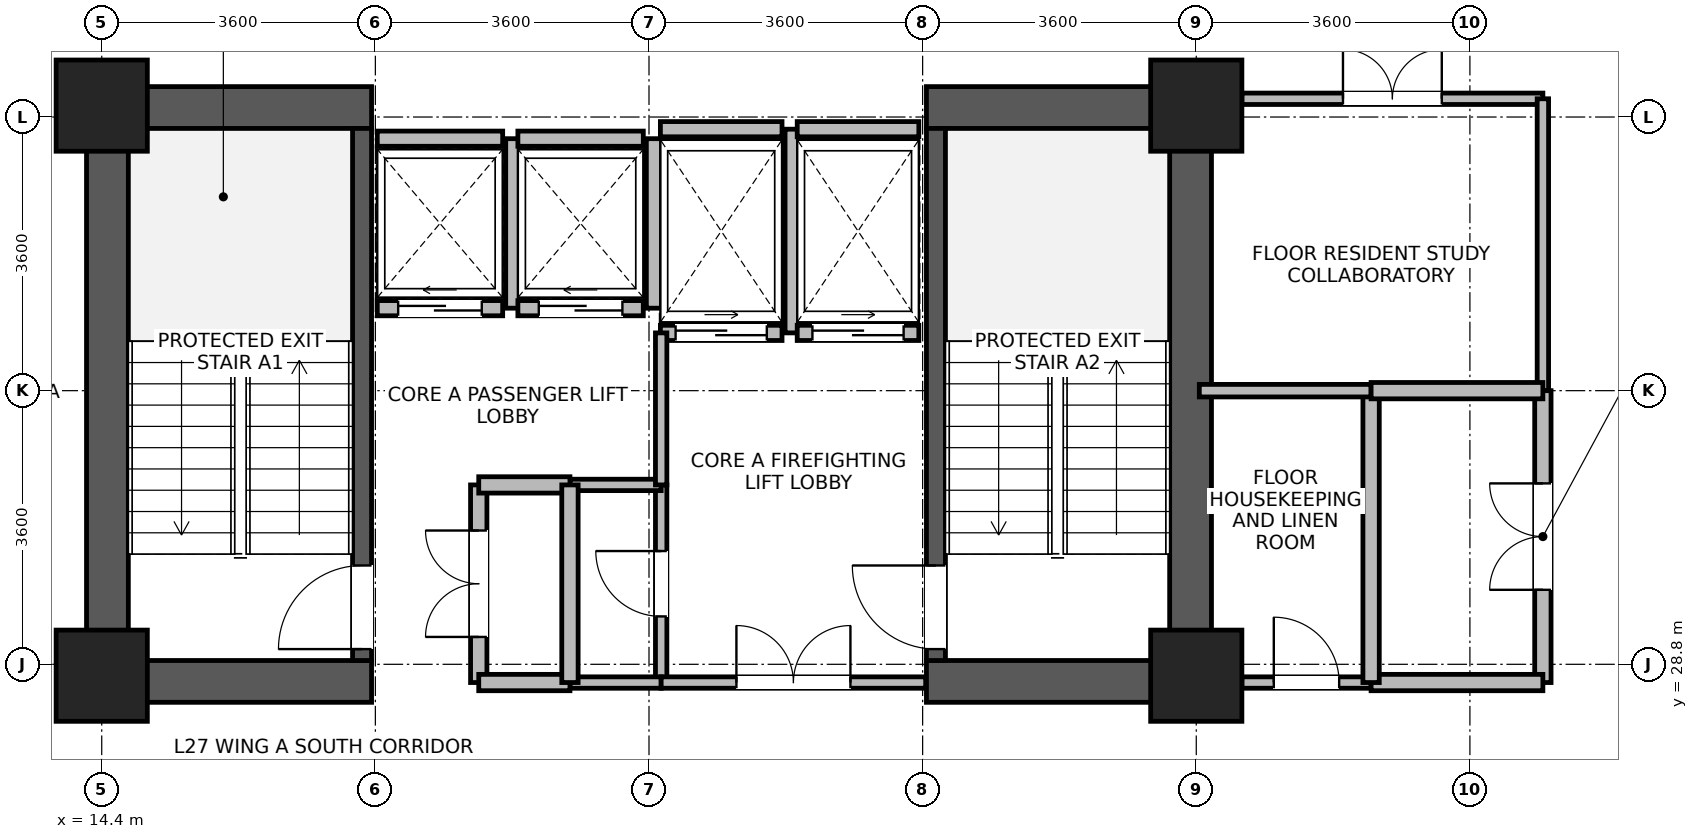
"""IFC4 building model, lengths in metres.
Left out: names, types, materials, properties, quantities, classifications, styles, units other than length and angle.
Written with IfcOpenShell. Run it as: python <this file> out.ifc"""

import sys

from ifc_helpers import new_model, si_unit, direction, frame, frame_2d, origin, origin_2d, place, context, subcontext, project, spatial, rectangle, extrude, source, transform, mapped, element, fill, save


model = new_model("IFC4")
c1 = context("Model", 3, precision=1e-05, world=origin(), true_north=direction((0.0, 1.0)))
c2 = subcontext(c1, "Body", "Model", "MODEL_VIEW")
j1 = project(units=[si_unit("LENGTHUNIT", "METRE"), si_unit("PLANEANGLEUNIT", "RADIAN")], contexts=[c1])
p1 = place(None, origin())
s1 = spatial("IfcSite", under=j1, at=p1, CompositionType="ELEMENT")
p2 = place(p1, origin())
s2 = spatial("IfcBuilding", under=s1, at=p2, CompositionType="ELEMENT")
p3 = place(p2, frame((0.0, 0.0, 108.2)))
s3 = spatial("IfcBuildingStorey", under=s2, at=p3, CompositionType="ELEMENT", Elevation=108.2)
for number, where, z_axis, x_axis in (
    (1, (14.475, 28.3, 0.0), (0.0, 0.0, 1.0), (0.0, 1.0, 0.0)),
    (2, (28.725, 28.3, 0.0), (0.0, 0.0, 1.0), (0.0, 1.0, 0.0)),
):
    element("IfcWall", number, at=place(p3, frame(where, z_axis=z_axis, x_axis=x_axis)), inside=s3, PredefinedType="SHEAR", context=c2, shape_type="SweptSolid", body=[
        extrude(rectangle(XDim=8.1, YDim=0.55, at=frame_2d((4.05, 0.0))), origin(), (0.0, 0.0, 1.0), 3.45),
    ])
for number, where, z_axis, x_axis in (
    (3, (14.75, 28.575, 0.0), (0.0, 0.0, 1.0), (1.0, 0.0, 0.0)),
    (4, (25.25, 28.575, 0.0), (0.0, 0.0, 1.0), (1.0, 0.0, 0.0)),
    (5, (14.75, 36.125, 0.0), (0.0, 0.0, 1.0), (1.0, 0.0, 0.0)),
    (6, (25.25, 36.125, 0.0), (0.0, 0.0, 1.0), (1.0, 0.0, 0.0)),
):
    element("IfcWall", number, at=place(p3, frame(where, z_axis=z_axis, x_axis=x_axis)), inside=s3, PredefinedType="SHEAR", context=c2, shape_type="SweptSolid", body=[
        extrude(rectangle(XDim=3.2, YDim=0.55, at=frame_2d((1.6, 0.0))), origin(), (0.0, 0.0, 1.0), 3.45),
    ])
p4 = place(p3, frame((17.825, 28.85, 0.0), z_axis=(0.0, 0.0, 1.0), x_axis=(0.0, 1.0, 0.0)))
e7 = element("IfcWall", 7, at=p4, inside=s3, PredefinedType="SHEAR", context=c2, shape_type="SweptSolid", body=[
    extrude(rectangle(XDim=7.0, YDim=0.25, at=frame_2d((3.5, 0.0))), origin(), (0.0, 0.0, 1.0), 3.45),
])
p5 = place(p4, frame((0.15, 0.0, 0.0)))
e8 = element("IfcOpeningElement", 8, at=p5, cuts=e7, PredefinedType="OPENING", context=c2, shape_type="SweptSolid", body=[
    extrude(rectangle(XDim=1.1, YDim=2.08, at=frame_2d((0.55, 1.04))), frame((0.0, 0.135, 0.0), z_axis=(0.0, -1.0, 0.0), x_axis=(1.0, 0.0, 0.0)), (0.0, 0.0, 1.0), 0.27),
])
p6 = place(p3, frame((25.375, 28.85, 0.0), z_axis=(0.0, 0.0, 1.0), x_axis=(0.0, 1.0, 0.0)))
e9 = element("IfcWall", 9, at=p6, inside=s3, PredefinedType="SHEAR", context=c2, shape_type="SweptSolid", body=[
    extrude(rectangle(XDim=7.0, YDim=0.25, at=frame_2d((3.5, 0.0))), origin(), (0.0, 0.0, 1.0), 3.45),
])
p7 = place(p6, frame((0.15, 0.0, 0.0)))
e10 = element("IfcOpeningElement", 10, at=p7, cuts=e9, PredefinedType="OPENING", context=c2, shape_type="SweptSolid", body=[
    extrude(rectangle(XDim=1.1, YDim=2.08, at=frame_2d((0.55, 1.04))), frame((0.0, 0.135, 0.0), z_axis=(0.0, -1.0, 0.0), x_axis=(1.0, 0.0, 0.0)), (0.0, 0.0, 1.0), 0.27),
])
m1 = source(origin(), c2, "Body", "SweptSolid", [
    extrude(rectangle(XDim=1.2, YDim=1.2, at=origin_2d()), origin(), (0.0, 0.0, 1.0), 3.7),
])
for number, where, z_axis, x_axis in (
    (11, (14.4, 28.65, 0.0), (0.0, 0.0, 1.0), (1.0, 0.0, 0.0)),
    (12, (14.4, 36.15, 0.0), (0.0, 0.0, 1.0), (1.0, 0.0, 0.0)),
    (13, (28.8, 28.65, 0.0), (0.0, 0.0, 1.0), (1.0, 0.0, 0.0)),
    (14, (28.8, 36.15, 0.0), (0.0, 0.0, 1.0), (1.0, 0.0, 0.0)),
):
    element("IfcColumn", number, at=place(p3, frame(where, z_axis=z_axis, x_axis=x_axis)), inside=s3, PredefinedType="COLUMN", context=c2, shape_type="MappedRepresentation", body=[
        mapped(m1, transform((0.0, 0.0, 0.0), x_axis=(1.0, 0.0, 0.0), y_axis=(0.0, 1.0, 0.0), z_axis=(0.0, 0.0, 1.0), scale=1.0)),
    ])
p8 = place(p3, frame((18.025, 33.485, 0.0), z_axis=(0.0, 0.0, 1.0), x_axis=(1.0, 0.0, 0.0)))
e15 = element("IfcWall", 15, at=p8, inside=s3, PredefinedType="PARTITIONING", context=c2, shape_type="SweptSolid", body=[
    extrude(rectangle(XDim=1.65, YDim=0.2, at=frame_2d((0.825, 0.0))), origin(), (0.0, 0.0, 1.0), 3.43),
])
p9 = place(p8, frame((0.275, 0.0, 0.0)))
e16 = element("IfcOpeningElement", 16, at=p9, cuts=e15, PredefinedType="OPENING", context=c2, shape_type="SweptSolid", body=[
    extrude(rectangle(XDim=1.1, YDim=2.12, at=frame_2d((0.55, 1.06))), frame((0.0, 0.11, 0.0), z_axis=(0.0, -1.0, 0.0), x_axis=(1.0, 0.0, 0.0)), (0.0, 0.0, 1.0), 0.22),
])
p10 = place(p3, frame((18.025, 35.715, 0.0), z_axis=(0.0, 0.0, 1.0), x_axis=(1.0, 0.0, 0.0)))
e17 = element("IfcWall", 17, at=p10, inside=s3, PredefinedType="PARTITIONING", context=c2, shape_type="SweptSolid", body=[
    extrude(rectangle(XDim=1.65, YDim=0.2, at=frame_2d((0.825, 0.0))), origin(), (0.0, 0.0, 1.0), 3.43),
])
p11 = place(p3, frame((19.815, 33.485, 0.0), z_axis=(0.0, 0.0, 1.0), x_axis=(0.0, 1.0, 0.0)))
e18 = element("IfcWall", 18, at=p11, inside=s3, PredefinedType="PARTITIONING", context=c2, shape_type="SweptSolid", body=[
    extrude(rectangle(XDim=2.23, YDim=0.2, at=frame_2d((1.115, 0.0))), origin(), (0.0, 0.0, 1.0), 3.43),
])
p12 = place(p3, frame((19.875, 33.485, 0.0), z_axis=(0.0, 0.0, 1.0), x_axis=(1.0, 0.0, 0.0)))
e19 = element("IfcWall", 19, at=p12, inside=s3, PredefinedType="PARTITIONING", context=c2, shape_type="SweptSolid", body=[
    extrude(rectangle(XDim=1.65, YDim=0.2, at=frame_2d((0.825, 0.0))), origin(), (0.0, 0.0, 1.0), 3.43),
])
p13 = place(p12, frame((0.275, 0.0, 0.0)))
e20 = element("IfcOpeningElement", 20, at=p13, cuts=e19, PredefinedType="OPENING", context=c2, shape_type="SweptSolid", body=[
    extrude(rectangle(XDim=1.1, YDim=2.12, at=frame_2d((0.55, 1.06))), frame((0.0, 0.11, 0.0), z_axis=(0.0, -1.0, 0.0), x_axis=(1.0, 0.0, 0.0)), (0.0, 0.0, 1.0), 0.22),
])
p14 = place(p3, frame((19.875, 35.715, 0.0), z_axis=(0.0, 0.0, 1.0), x_axis=(1.0, 0.0, 0.0)))
e21 = element("IfcWall", 21, at=p14, inside=s3, PredefinedType="PARTITIONING", context=c2, shape_type="SweptSolid", body=[
    extrude(rectangle(XDim=1.65, YDim=0.2, at=frame_2d((0.825, 0.0))), origin(), (0.0, 0.0, 1.0), 3.43),
])
p15 = place(p3, frame((21.665, 33.485, 0.0), z_axis=(0.0, 0.0, 1.0), x_axis=(0.0, 1.0, 0.0)))
e22 = element("IfcWall", 22, at=p15, inside=s3, PredefinedType="PARTITIONING", context=c2, shape_type="SweptSolid", body=[
    extrude(rectangle(XDim=2.23, YDim=0.2, at=frame_2d((1.115, 0.0))), origin(), (0.0, 0.0, 1.0), 3.43),
])
p16 = place(p3, frame((21.75, 33.16, 0.0), z_axis=(0.0, 0.0, 1.0), x_axis=(1.0, 0.0, 0.0)))
e23 = element("IfcWall", 23, at=p16, inside=s3, PredefinedType="PARTITIONING", context=c2, shape_type="SweptSolid", body=[
    extrude(rectangle(XDim=1.6, YDim=0.2, at=frame_2d((0.8, 0.0))), origin(), (0.0, 0.0, 1.0), 3.43),
])
p17 = place(p16, frame((0.2, 0.0, 0.0)))
e24 = element("IfcOpeningElement", 24, at=p17, cuts=e23, PredefinedType="OPENING", context=c2, shape_type="SweptSolid", body=[
    extrude(rectangle(XDim=1.2, YDim=2.12, at=frame_2d((0.6, 1.06))), frame((0.0, 0.11, 0.0), z_axis=(0.0, -1.0, 0.0), x_axis=(1.0, 0.0, 0.0)), (0.0, 0.0, 1.0), 0.22),
])
p18 = place(p3, frame((21.75, 35.84, 0.0), z_axis=(0.0, 0.0, 1.0), x_axis=(1.0, 0.0, 0.0)))
e25 = element("IfcWall", 25, at=p18, inside=s3, PredefinedType="PARTITIONING", context=c2, shape_type="SweptSolid", body=[
    extrude(rectangle(XDim=1.6, YDim=0.2, at=frame_2d((0.8, 0.0))), origin(), (0.0, 0.0, 1.0), 2.43),
])
p19 = place(p3, frame((23.49, 33.16, 0.0), z_axis=(0.0, 0.0, 1.0), x_axis=(0.0, 1.0, 0.0)))
e26 = element("IfcWall", 26, at=p19, inside=s3, PredefinedType="PARTITIONING", context=c2, shape_type="SweptSolid", body=[
    extrude(rectangle(XDim=2.68, YDim=0.2, at=frame_2d((1.34, 0.0))), origin(), (0.0, 0.0, 1.0), 3.43),
])
p20 = place(p3, frame((23.55, 33.16, 0.0), z_axis=(0.0, 0.0, 1.0), x_axis=(1.0, 0.0, 0.0)))
e27 = element("IfcWall", 27, at=p20, inside=s3, PredefinedType="PARTITIONING", context=c2, shape_type="SweptSolid", body=[
    extrude(rectangle(XDim=1.6, YDim=0.2, at=frame_2d((0.8, 0.0))), origin(), (0.0, 0.0, 1.0), 3.43),
])
p21 = place(p20, frame((0.2, 0.0, 0.0)))
e28 = element("IfcOpeningElement", 28, at=p21, cuts=e27, PredefinedType="OPENING", context=c2, shape_type="SweptSolid", body=[
    extrude(rectangle(XDim=1.2, YDim=2.12, at=frame_2d((0.6, 1.06))), frame((0.0, 0.11, 0.0), z_axis=(0.0, -1.0, 0.0), x_axis=(1.0, 0.0, 0.0)), (0.0, 0.0, 1.0), 0.22),
])
p22 = place(p3, frame((23.55, 35.84, 0.0), z_axis=(0.0, 0.0, 1.0), x_axis=(1.0, 0.0, 0.0)))
e29 = element("IfcWall", 29, at=p22, inside=s3, PredefinedType="PARTITIONING", context=c2, shape_type="SweptSolid", body=[
    extrude(rectangle(XDim=1.6, YDim=0.2, at=frame_2d((0.8, 0.0))), origin(), (0.0, 0.0, 1.0), 2.43),
])
p23 = place(p3, frame((29.4, 36.24, 0.0), z_axis=(0.0, 0.0, 1.0), x_axis=(1.0, 0.0, 0.0)))
e30 = element("IfcWall", 30, at=p23, inside=s3, PredefinedType="PARTITIONING", context=c2, shape_type="SweptSolid", body=[
    extrude(rectangle(XDim=3.96, YDim=0.15, at=frame_2d((1.98, 0.0))), origin(), (0.0, 0.0, 1.0), 2.78),
])
p24 = place(p23, frame((1.33, 0.0, 0.0)))
e31 = element("IfcOpeningElement", 31, at=p24, cuts=e30, PredefinedType="OPENING", context=c2, shape_type="SweptSolid", body=[
    extrude(rectangle(XDim=1.3, YDim=2.12, at=frame_2d((0.65, 1.06))), frame((0.0, 0.085, 0.0), z_axis=(0.0, -1.0, 0.0), x_axis=(1.0, 0.0, 0.0)), (0.0, 0.0, 1.0), 0.17),
])
p25 = place(p3, frame((33.36, 32.4, 0.0), z_axis=(0.0, 0.0, 1.0), x_axis=(0.0, 1.0, 0.0)))
e32 = element("IfcWall", 32, at=p25, inside=s3, PredefinedType="PARTITIONING", context=c2, shape_type="SweptSolid", body=[
    extrude(rectangle(XDim=3.84, YDim=0.15, at=frame_2d((1.92, 0.0))), origin(), (0.0, 0.0, 1.0), 3.43),
])
p26 = place(p3, frame((33.36, 28.56, 0.0), z_axis=(0.0, 0.0, 1.0), x_axis=(0.0, 1.0, 0.0)))
e33 = element("IfcWall", 33, at=p26, inside=s3, PredefinedType="PARTITIONING", context=c2, shape_type="SweptSolid", body=[
    extrude(rectangle(XDim=3.84, YDim=0.215, at=frame_2d((1.92, 0.0))), origin(), (0.0, 0.0, 1.0), 3.43),
])
p27 = place(p26, frame((1.22, 0.0, 0.0)))
e34 = element("IfcOpeningElement", 34, at=p27, cuts=e33, PredefinedType="OPENING", context=c2, shape_type="SweptSolid", body=[
    extrude(rectangle(XDim=1.4, YDim=2.15, at=frame_2d((0.7, 1.075))), frame((0.0, 0.118, 0.0), z_axis=(0.0, -1.0, 0.0), x_axis=(1.0, 0.0, 0.0)), (0.0, 0.0, 1.0), 0.235),
])
p28 = place(p3, frame((19.36, 28.56, 0.0), z_axis=(0.0, 0.0, 1.0), x_axis=(0.0, 1.0, 0.0)))
e35 = element("IfcWall", 35, at=p28, inside=s3, PredefinedType="PARTITIONING", context=c2, shape_type="SweptSolid", body=[
    extrude(rectangle(XDim=2.6, YDim=0.215, at=frame_2d((1.3, 0.0))), origin(), (0.0, 0.0, 1.0), 3.43),
])
p29 = place(p28, frame((0.6, 0.0, 0.0)))
e36 = element("IfcOpeningElement", 36, at=p29, cuts=e35, PredefinedType="OPENING", context=c2, shape_type="SweptSolid", body=[
    extrude(rectangle(XDim=1.4, YDim=2.15, at=frame_2d((0.7, 1.075))), frame((0.0, 0.118, 0.0), z_axis=(0.0, -1.0, 0.0), x_axis=(1.0, 0.0, 0.0)), (0.0, 0.0, 1.0), 0.235),
])
p30 = place(p3, frame((21.76, 28.56, 0.0), z_axis=(0.0, 0.0, 1.0), x_axis=(0.0, 1.0, 0.0)))
e37 = element("IfcWall", 37, at=p30, inside=s3, PredefinedType="PARTITIONING", context=c2, shape_type="SweptSolid", body=[
    extrude(rectangle(XDim=2.6, YDim=0.15, at=frame_2d((1.3, 0.0))), origin(), (0.0, 0.0, 1.0), 3.43),
])
p31 = place(p30, frame((0.87, 0.0, 0.0)))
e38 = element("IfcOpeningElement", 38, at=p31, cuts=e37, PredefinedType="OPENING", context=c2, shape_type="SweptSolid", body=[
    extrude(rectangle(XDim=0.86, YDim=2.02, at=frame_2d((0.43, 1.01))), frame((0.0, 0.085, 0.0), z_axis=(0.0, -1.0, 0.0), x_axis=(1.0, 0.0, 0.0)), (0.0, 0.0, 1.0), 0.17),
])
p32 = place(p3, frame((29.4, 28.56, 0.0), z_axis=(0.0, 0.0, 1.0), x_axis=(1.0, 0.0, 0.0)))
e39 = element("IfcWall", 39, at=p32, inside=s3, PredefinedType="PARTITIONING", context=c2, shape_type="SweptSolid", body=[
    extrude(rectangle(XDim=1.7, YDim=0.15, at=frame_2d((0.85, 0.0))), origin(), (0.0, 0.0, 1.0), 2.78),
])
p33 = place(p32, frame((0.42, 0.0, 0.0)))
e40 = element("IfcOpeningElement", 40, at=p33, cuts=e39, PredefinedType="OPENING", context=c2, shape_type="SweptSolid", body=[
    extrude(rectangle(XDim=0.86, YDim=2.02, at=frame_2d((0.43, 1.01))), frame((0.0, 0.085, 0.0), z_axis=(0.0, -1.0, 0.0), x_axis=(1.0, 0.0, 0.0)), (0.0, 0.0, 1.0), 0.17),
])
p34 = place(p3, frame((31.1, 28.56, 0.0), z_axis=(0.0, 0.0, 1.0), x_axis=(1.0, 0.0, 0.0)))
e41 = element("IfcWall", 41, at=p34, inside=s3, PredefinedType="PARTITIONING", context=c2, shape_type="SweptSolid", body=[
    extrude(rectangle(XDim=2.26, YDim=0.215, at=frame_2d((1.13, 0.0))), origin(), (0.0, 0.0, 1.0), 2.78),
])
p35 = place(p3, frame((20.56, 28.56, 0.0), z_axis=(0.0, 0.0, 1.0), x_axis=(1.0, 0.0, 0.0)))
e42 = element("IfcWall", 42, at=p35, inside=s3, PredefinedType="PARTITIONING", context=c2, shape_type="SweptSolid", body=[
    extrude(rectangle(XDim=1.2, YDim=0.15, at=frame_2d((0.6, 0.0))), origin(), (0.0, 0.0, 1.0), 2.43),
])
p36 = place(p3, frame((20.56, 31.16, 0.0), z_axis=(0.0, 0.0, 1.0), x_axis=(1.0, 0.0, 0.0)))
e43 = element("IfcWall", 43, at=p36, inside=s3, PredefinedType="PARTITIONING", context=c2, shape_type="SweptSolid", body=[
    extrude(rectangle(XDim=1.2, YDim=0.15, at=frame_2d((0.6, 0.0))), origin(), (0.0, 0.0, 1.0), 3.43),
])
p37 = place(p3, frame((19.36, 28.56, 0.0), z_axis=(0.0, 0.0, 1.0), x_axis=(1.0, 0.0, 0.0)))
e44 = element("IfcWall", 44, at=p37, inside=s3, PredefinedType="PARTITIONING", context=c2, shape_type="SweptSolid", body=[
    extrude(rectangle(XDim=1.2, YDim=0.215, at=frame_2d((0.6, 0.0))), origin(), (0.0, 0.0, 1.0), 2.43),
])
p38 = place(p3, frame((19.36, 31.16, 0.0), z_axis=(0.0, 0.0, 1.0), x_axis=(1.0, 0.0, 0.0)))
e45 = element("IfcWall", 45, at=p38, inside=s3, PredefinedType="PARTITIONING", context=c2, shape_type="SweptSolid", body=[
    extrude(rectangle(XDim=1.2, YDim=0.215, at=frame_2d((0.6, 0.0))), origin(), (0.0, 0.0, 1.0), 3.43),
])
p39 = place(p3, frame((31.1, 28.56, 0.0), z_axis=(0.0, 0.0, 1.0), x_axis=(0.0, 1.0, 0.0)))
e46 = element("IfcWall", 46, at=p39, inside=s3, PredefinedType="PARTITIONING", context=c2, shape_type="SweptSolid", body=[
    extrude(rectangle(XDim=3.84, YDim=0.215, at=frame_2d((1.92, 0.0))), origin(), (0.0, 0.0, 1.0), 3.43),
])
p40 = place(p3, frame((21.76, 28.56, 0.0), z_axis=(0.0, 0.0, 1.0), x_axis=(1.0, 0.0, 0.0)))
e47 = element("IfcWall", 47, at=p40, inside=s3, PredefinedType="PARTITIONING", context=c2, shape_type="SweptSolid", body=[
    extrude(rectangle(XDim=3.48, YDim=0.15, at=frame_2d((1.74, 0.0))), origin(), (0.0, 0.0, 1.0), 2.43),
])
p41 = place(p40, frame((0.99, 0.0, 0.0)))
e48 = element("IfcOpeningElement", 48, at=p41, cuts=e47, PredefinedType="OPENING", context=c2, shape_type="SweptSolid", body=[
    extrude(rectangle(XDim=1.5, YDim=2.1, at=frame_2d((0.75, 1.05))), frame((0.0, 0.085, 0.0), z_axis=(0.0, -1.0, 0.0), x_axis=(1.0, 0.0, 0.0)), (0.0, 0.0, 1.0), 0.17),
])
p42 = place(p3, frame((20.56, 28.56, 0.0), z_axis=(0.0, 0.0, 1.0), x_axis=(0.0, 1.0, 0.0)))
e49 = element("IfcWall", 49, at=p42, inside=s3, PredefinedType="PARTITIONING", context=c2, shape_type="SweptSolid", body=[
    extrude(rectangle(XDim=2.6, YDim=0.215, at=frame_2d((1.3, 0.0))), origin(), (0.0, 0.0, 1.0), 3.43),
])
p43 = place(p3, frame((28.84, 32.4, 0.0), z_axis=(0.0, 0.0, 1.0), x_axis=(1.0, 0.0, 0.0)))
e50 = element("IfcWall", 50, at=p43, inside=s3, PredefinedType="PARTITIONING", context=c2, shape_type="SweptSolid", body=[
    extrude(rectangle(XDim=2.26, YDim=0.165, at=frame_2d((1.13, 0.0))), origin(), (0.0, 0.0, 1.0), 3.43),
])
p44 = place(p3, frame((31.1, 32.4, 0.0), z_axis=(0.0, 0.0, 1.0), x_axis=(1.0, 0.0, 0.0)))
e51 = element("IfcWall", 51, at=p44, inside=s3, PredefinedType="PARTITIONING", context=c2, shape_type="SweptSolid", body=[
    extrude(rectangle(XDim=2.26, YDim=0.215, at=frame_2d((1.13, 0.0))), origin(), (0.0, 0.0, 1.0), 3.43),
])
p45 = place(p3, frame((21.76, 31.16, 0.0), z_axis=(0.0, 0.0, 1.0), x_axis=(0.0, 1.0, 0.0)))
e52 = element("IfcWall", 52, at=p45, inside=s3, PredefinedType="PARTITIONING", context=c2, shape_type="SweptSolid", body=[
    extrude(rectangle(XDim=2.0, YDim=0.15, at=frame_2d((1.0, 0.0))), origin(), (0.0, 0.0, 1.0), 3.43),
])
p46 = place(p5, origin())
e53 = element("IfcDoor", 53, at=p46, inside=s3, OperationType="SINGLE_SWING_LEFT", PredefinedType="DOOR", context=c2, shape_type="SweptSolid", body=[
    extrude(rectangle(XDim=1.1, YDim=2.08, at=frame_2d((0.55, 1.04))), frame((0.0, 0.025, 0.0), z_axis=(0.0, -1.0, 0.0), x_axis=(1.0, 0.0, 0.0)), (0.0, 0.0, 1.0), 0.05),
])
fill(e8, e53)
p47 = place(p7, origin())
e54 = element("IfcDoor", 54, at=p47, inside=s3, OperationType="SINGLE_SWING_RIGHT", PredefinedType="DOOR", context=c2, shape_type="SweptSolid", body=[
    extrude(rectangle(XDim=1.1, YDim=2.08, at=frame_2d((0.55, 1.04))), frame((0.0, 0.025, 0.0), z_axis=(0.0, -1.0, 0.0), x_axis=(1.0, 0.0, 0.0)), (0.0, 0.0, 1.0), 0.05),
])
fill(e10, e54)
p48 = place(p9, origin())
e55 = element("IfcDoor", 55, at=p48, inside=s3, OperationType="SLIDING_TO_LEFT", PredefinedType="DOOR", context=c2, shape_type="SweptSolid", body=[
    extrude(rectangle(XDim=1.1, YDim=2.12, at=frame_2d((0.55, 1.06))), frame((0.0, 0.025, 0.0), z_axis=(0.0, -1.0, 0.0), x_axis=(1.0, 0.0, 0.0)), (0.0, 0.0, 1.0), 0.05),
])
fill(e16, e55)
p49 = place(p13, origin())
e56 = element("IfcDoor", 56, at=p49, inside=s3, OperationType="SLIDING_TO_LEFT", PredefinedType="DOOR", context=c2, shape_type="SweptSolid", body=[
    extrude(rectangle(XDim=1.1, YDim=2.12, at=frame_2d((0.55, 1.06))), frame((0.0, 0.025, 0.0), z_axis=(0.0, -1.0, 0.0), x_axis=(1.0, 0.0, 0.0)), (0.0, 0.0, 1.0), 0.05),
])
fill(e20, e56)
p50 = place(p17, origin())
e57 = element("IfcDoor", 57, at=p50, inside=s3, OperationType="SLIDING_TO_RIGHT", PredefinedType="DOOR", context=c2, shape_type="SweptSolid", body=[
    extrude(rectangle(XDim=1.2, YDim=2.12, at=frame_2d((0.6, 1.06))), frame((0.0, 0.025, 0.0), z_axis=(0.0, -1.0, 0.0), x_axis=(1.0, 0.0, 0.0)), (0.0, 0.0, 1.0), 0.05),
])
fill(e24, e57)
p51 = place(p21, origin())
e58 = element("IfcDoor", 58, at=p51, inside=s3, OperationType="SLIDING_TO_RIGHT", PredefinedType="DOOR", context=c2, shape_type="SweptSolid", body=[
    extrude(rectangle(XDim=1.2, YDim=2.12, at=frame_2d((0.6, 1.06))), frame((0.0, 0.025, 0.0), z_axis=(0.0, -1.0, 0.0), x_axis=(1.0, 0.0, 0.0)), (0.0, 0.0, 1.0), 0.05),
])
fill(e28, e58)
p52 = place(p24, origin())
e59 = element("IfcDoor", 59, at=p52, inside=s3, OperationType="DOUBLE_DOOR_SINGLE_SWING", PredefinedType="DOOR", context=c2, shape_type="SweptSolid", body=[
    extrude(rectangle(XDim=1.3, YDim=2.12, at=frame_2d((0.65, 1.06))), frame((0.0, 0.025, 0.0), z_axis=(0.0, -1.0, 0.0), x_axis=(1.0, 0.0, 0.0)), (0.0, 0.0, 1.0), 0.05),
])
fill(e31, e59)
p53 = place(p27, origin())
e60 = element("IfcDoor", 60, at=p53, inside=s3, OperationType="DOUBLE_DOOR_SINGLE_SWING", PredefinedType="DOOR", context=c2, shape_type="SweptSolid", body=[
    extrude(rectangle(XDim=1.4, YDim=2.15, at=frame_2d((0.7, 1.075))), frame((0.0, 0.025, 0.0), z_axis=(0.0, -1.0, 0.0), x_axis=(1.0, 0.0, 0.0)), (0.0, 0.0, 1.0), 0.05),
])
fill(e34, e60)
p54 = place(p29, origin())
e61 = element("IfcDoor", 61, at=p54, inside=s3, OperationType="DOUBLE_DOOR_SINGLE_SWING", PredefinedType="DOOR", context=c2, shape_type="SweptSolid", body=[
    extrude(rectangle(XDim=1.4, YDim=2.15, at=frame_2d((0.7, 1.075))), frame((0.0, 0.025, 0.0), z_axis=(0.0, -1.0, 0.0), x_axis=(1.0, 0.0, 0.0)), (0.0, 0.0, 1.0), 0.05),
])
fill(e36, e61)
p55 = place(p31, origin())
e62 = element("IfcDoor", 62, at=p55, inside=s3, OperationType="SINGLE_SWING_RIGHT", PredefinedType="DOOR", context=c2, shape_type="SweptSolid", body=[
    extrude(rectangle(XDim=0.86, YDim=2.02, at=frame_2d((0.43, 1.01))), frame((0.0, 0.025, 0.0), z_axis=(0.0, -1.0, 0.0), x_axis=(1.0, 0.0, 0.0)), (0.0, 0.0, 1.0), 0.05),
])
fill(e38, e62)
p56 = place(p33, origin())
e63 = element("IfcDoor", 63, at=p56, inside=s3, OperationType="SINGLE_SWING_LEFT", PredefinedType="DOOR", context=c2, shape_type="SweptSolid", body=[
    extrude(rectangle(XDim=0.86, YDim=2.02, at=frame_2d((0.43, 1.01))), frame((0.0, 0.025, 0.0), z_axis=(0.0, -1.0, 0.0), x_axis=(1.0, 0.0, 0.0)), (0.0, 0.0, 1.0), 0.05),
])
fill(e40, e63)
p57 = place(p41, origin())
e64 = element("IfcDoor", 64, at=p57, inside=s3, OperationType="DOUBLE_DOOR_SINGLE_SWING", PredefinedType="DOOR", context=c2, shape_type="SweptSolid", body=[
    extrude(rectangle(XDim=1.5, YDim=2.1, at=frame_2d((0.75, 1.05))), frame((0.0, 0.025, 0.0), z_axis=(0.0, -1.0, 0.0), x_axis=(1.0, 0.0, 0.0)), (0.0, 0.0, 1.0), 0.05),
])
fill(e48, e64)
save(model, sys.argv[1])
